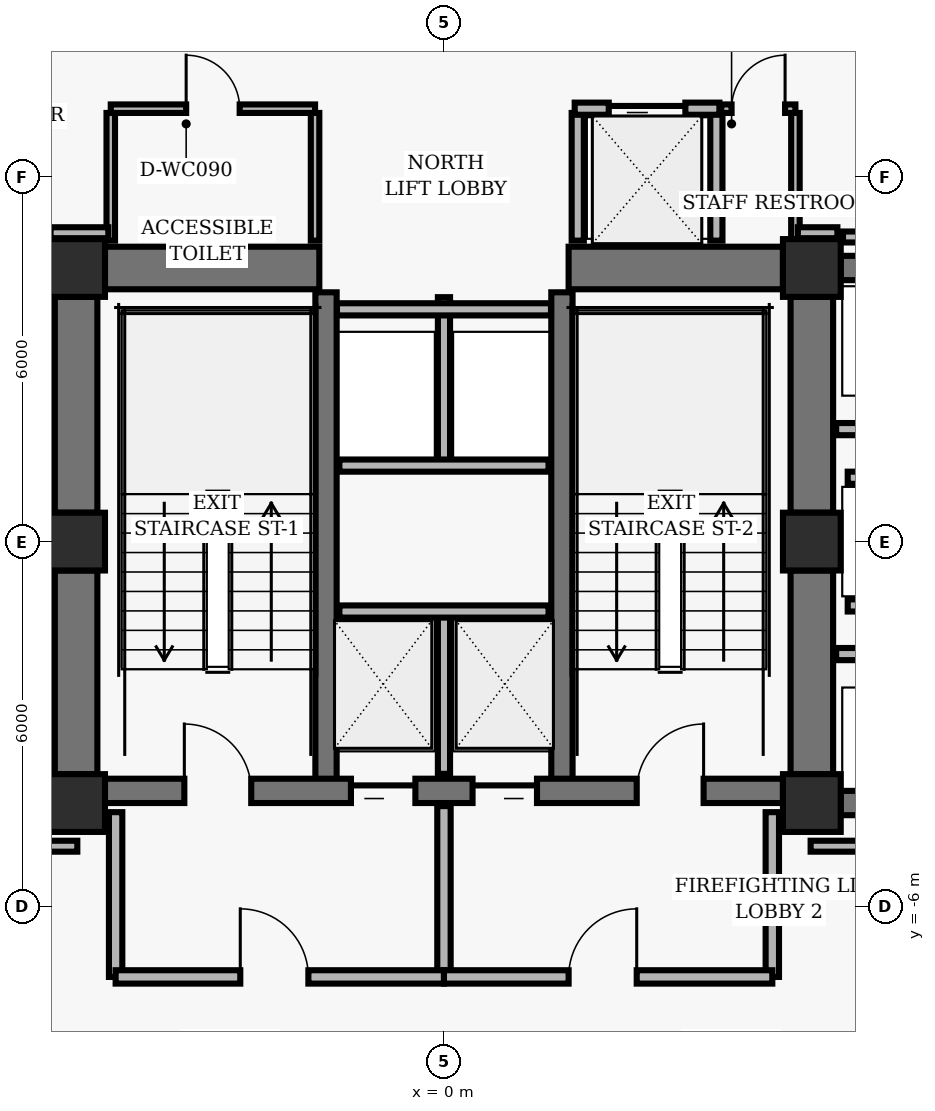
"""IFC4 building model, lengths in metres.
Left out: names, types, materials, properties, quantities, classifications, styles, units other than length and angle.
Written with IfcOpenShell. Run it as: python <this file> out.ifc"""

import sys

from ifc_helpers import new_model, si_unit, direction, frame, frame_2d, origin, origin_2d, place, context, subcontext, project, spatial, rectangle, hollow_rectangle, extrude, element, fill, save


model = new_model("IFC4")
c1 = context("Model", 3, precision=1e-05, world=origin(), true_north=direction((0.0, 1.0)))
c2 = subcontext(c1, "Body", "Model", "MODEL_VIEW")
j1 = project(units=[si_unit("LENGTHUNIT", "METRE"), si_unit("PLANEANGLEUNIT", "RADIAN")], contexts=[c1])
p1 = place(None, origin())
s1 = spatial("IfcSite", under=j1, at=p1, CompositionType="ELEMENT")
p2 = place(p1, origin())
s2 = spatial("IfcBuilding", under=s1, at=p2, CompositionType="ELEMENT")
p3 = place(p2, frame((0.0, 0.0, 25.6)))
s3 = spatial("IfcBuildingStorey", under=s2, at=p3, CompositionType="ELEMENT", Elevation=25.6)
for number, where, z_axis, x_axis in (
    (1, (-6.05, 4.5, 0.0), (0.0, 0.0, 1.0), (1.0, 0.0, 0.0)),
    (2, (6.05, 4.5, 0.0), (0.0, 0.0, 1.0), (1.0, 0.0, 0.0)),
    (3, (-6.05, 0.0, 0.0), (0.0, 0.0, 1.0), (1.0, 0.0, 0.0)),
    (4, (6.05, 0.0, 0.0), (0.0, 0.0, 1.0), (1.0, 0.0, 0.0)),
    (5, (-6.05, -4.3, 0.0), (0.0, 0.0, 1.0), (1.0, 0.0, 0.0)),
    (6, (6.05, -4.3, 0.0), (0.0, 0.0, 1.0), (1.0, 0.0, 0.0)),
):
    element("IfcColumn", number, at=place(p3, frame(where, z_axis=z_axis, x_axis=x_axis)), inside=s3, PredefinedType="COLUMN", context=c2, shape_type="SweptSolid", body=[
        extrude(hollow_rectangle(XDim=0.95, YDim=0.95, WallThickness=0.06, InnerFilletRadius=0.02, OuterFilletRadius=0.04, at=origin_2d()), origin(), (0.0, 0.0, 1.0), 3.36),
    ])
p4 = place(p3, frame((-6.05, 0.475, 0.0), z_axis=(0.0, 0.0, 1.0), x_axis=(0.0, 1.0, 0.0)))
e7 = element("IfcWall", 7, at=p4, inside=s3, PredefinedType="SHEAR", context=c2, shape_type="SweptSolid", body=[
    extrude(rectangle(XDim=3.55, YDim=0.7, at=frame_2d((1.775, 0.0))), origin(), (0.0, 0.0, 1.0), 3.098),
])
p5 = place(p3, frame((-6.05, -3.825, 0.0), z_axis=(0.0, 0.0, 1.0), x_axis=(0.0, 1.0, 0.0)))
e8 = element("IfcWall", 8, at=p5, inside=s3, PredefinedType="SHEAR", context=c2, shape_type="SweptSolid", body=[
    extrude(rectangle(XDim=3.35, YDim=0.7, at=frame_2d((1.675, 0.0))), origin(), (0.0, 0.0, 1.0), 3.098),
])
p6 = place(p3, frame((6.05, 0.475, 0.0), z_axis=(0.0, 0.0, 1.0), x_axis=(0.0, 1.0, 0.0)))
e9 = element("IfcWall", 9, at=p6, inside=s3, PredefinedType="SHEAR", context=c2, shape_type="SweptSolid", body=[
    extrude(rectangle(XDim=3.55, YDim=0.7, at=frame_2d((1.775, 0.0))), origin(), (0.0, 0.0, 1.0), 3.098),
])
p7 = place(p3, frame((6.05, -3.825, 0.0), z_axis=(0.0, 0.0, 1.0), x_axis=(0.0, 1.0, 0.0)))
e10 = element("IfcWall", 10, at=p7, inside=s3, PredefinedType="SHEAR", context=c2, shape_type="SweptSolid", body=[
    extrude(rectangle(XDim=3.35, YDim=0.7, at=frame_2d((1.675, 0.0))), origin(), (0.0, 0.0, 1.0), 3.098),
])
for number, where, z_axis, x_axis in (
    (11, (-1.94, -4.1, 0.0), (0.0, 0.0, 1.0), (0.0, 1.0, 0.0)),
    (12, (1.94, -4.1, 0.0), (0.0, 0.0, 1.0), (0.0, 1.0, 0.0)),
):
    element("IfcWall", number, at=place(p3, frame(where, z_axis=z_axis, x_axis=x_axis)), inside=s3, PredefinedType="SHEAR", context=c2, shape_type="SweptSolid", body=[
        extrude(rectangle(XDim=8.2, YDim=0.35, at=frame_2d((4.1, 0.0))), origin(), (0.0, 0.0, 1.0), 3.098),
    ])
p8 = place(p3, frame((-5.575, -4.1, 0.0), z_axis=(0.0, 0.0, 1.0), x_axis=(1.0, 0.0, 0.0)))
e13 = element("IfcWall", 13, at=p8, inside=s3, PredefinedType="SHEAR", context=c2, shape_type="SweptSolid", body=[
    extrude(rectangle(XDim=11.15, YDim=0.4, at=frame_2d((5.575, 0.0))), origin(), (0.0, 0.0, 1.0), 3.098),
])
p9 = place(p8, frame((1.305, 0.0, 0.0)))
e14 = element("IfcOpeningElement", 14, at=p9, cuts=e13, PredefinedType="OPENING", context=c2, shape_type="SweptSolid", body=[
    extrude(rectangle(XDim=1.1, YDim=2.04, at=frame_2d((0.55, 1.02))), frame((0.0, 0.21, 0.0), z_axis=(0.0, -1.0, 0.0), x_axis=(1.0, 0.0, 0.0)), (0.0, 0.0, 1.0), 0.42),
])
p10 = place(p8, frame((8.745, 0.0, 0.0)))
e15 = element("IfcOpeningElement", 15, at=p10, cuts=e13, PredefinedType="OPENING", context=c2, shape_type="SweptSolid", body=[
    extrude(rectangle(XDim=1.1, YDim=2.04, at=frame_2d((0.55, 1.02))), frame((0.0, 0.21, 0.0), z_axis=(0.0, -1.0, 0.0), x_axis=(1.0, 0.0, 0.0)), (0.0, 0.0, 1.0), 0.42),
])
p11 = place(p8, frame((4.045, 0.0, 0.0)))
e16 = element("IfcOpeningElement", 16, at=p11, cuts=e13, PredefinedType="OPENING", context=c2, shape_type="SweptSolid", body=[
    extrude(rectangle(XDim=1.06, YDim=2.04, at=frame_2d((0.53, 1.02))), frame((0.0, 0.21, 0.0), z_axis=(0.0, -1.0, 0.0), x_axis=(1.0, 0.0, 0.0)), (0.0, 0.0, 1.0), 0.42),
])
p12 = place(p8, frame((6.045, 0.0, 0.0)))
e17 = element("IfcOpeningElement", 17, at=p12, cuts=e13, PredefinedType="OPENING", context=c2, shape_type="SweptSolid", body=[
    extrude(rectangle(XDim=1.06, YDim=2.04, at=frame_2d((0.53, 1.02))), frame((0.0, 0.21, 0.0), z_axis=(0.0, -1.0, 0.0), x_axis=(1.0, 0.0, 0.0)), (0.0, 0.0, 1.0), 0.42),
])
for number, where, z_axis, x_axis in (
    (18, (-5.575, 4.5, 0.0), (0.0, 0.0, 1.0), (1.0, 0.0, 0.0)),
    (19, (2.05, 4.5, 0.0), (0.0, 0.0, 1.0), (1.0, 0.0, 0.0)),
):
    element("IfcWall", number, at=place(p3, frame(where, z_axis=z_axis, x_axis=x_axis)), inside=s3, PredefinedType="SHEAR", context=c2, shape_type="SweptSolid", body=[
        extrude(rectangle(XDim=3.525, YDim=0.7, at=frame_2d((1.762, 0.0))), origin(), (0.0, 0.0, 1.0), 3.098),
    ])
for number, where, z_axis, x_axis in (
    (20, (6.525, 4.5, 0.0), (0.0, 0.0, 1.0), (1.0, 0.0, 0.0)),
    (21, (6.525, -4.3, 0.0), (0.0, 0.0, 1.0), (1.0, 0.0, 0.0)),
):
    element("IfcWall", number, at=place(p3, frame(where, z_axis=z_axis, x_axis=x_axis)), inside=s3, PredefinedType="SHEAR", context=c2, shape_type="SweptSolid", body=[
        extrude(rectangle(XDim=1.95, YDim=0.4, at=frame_2d((0.975, 0.0))), origin(), (0.0, 0.0, 1.0), 3.098),
    ])
p13 = place(p3, frame((0.0, -3.82, 0.0), z_axis=(0.0, 0.0, 1.0), x_axis=(0.0, 1.0, 0.0)))
e22 = element("IfcWall", 22, at=p13, inside=s3, PredefinedType="PARTITIONING", context=c2, shape_type="SweptSolid", body=[
    extrude(rectangle(XDim=2.67, YDim=0.2, at=frame_2d((1.335, 0.0))), origin(), (0.0, 0.0, 1.0), 3.073),
])
p14 = place(p3, frame((-1.72, -1.15, 0.0), z_axis=(0.0, 0.0, 1.0), x_axis=(1.0, 0.0, 0.0)))
e23 = element("IfcWall", 23, at=p14, inside=s3, PredefinedType="PARTITIONING", context=c2, shape_type="SweptSolid", body=[
    extrude(rectangle(XDim=3.44, YDim=0.2, at=frame_2d((1.72, 0.0))), origin(), (0.0, 0.0, 1.0), 3.073),
])
for number, where, z_axis, x_axis in (
    (24, (-5.4, -7.16, 0.0), (0.0, 0.0, 1.0), (0.0, 1.0, 0.0)),
    (25, (5.4, -7.16, 0.0), (0.0, 0.0, 1.0), (0.0, 1.0, 0.0)),
):
    element("IfcWall", number, at=place(p3, frame(where, z_axis=z_axis, x_axis=x_axis)), inside=s3, PredefinedType="PARTITIONING", context=c2, shape_type="SweptSolid", body=[
        extrude(rectangle(XDim=2.71, YDim=0.22, at=frame_2d((1.355, 0.0))), origin(), (0.0, 0.0, 1.0), 3.073),
    ])
p15 = place(p3, frame((0.0, -7.16, 0.0), z_axis=(0.0, 0.0, 1.0), x_axis=(0.0, 1.0, 0.0)))
e26 = element("IfcWall", 26, at=p15, inside=s3, PredefinedType="PARTITIONING", context=c2, shape_type="SweptSolid", body=[
    extrude(rectangle(XDim=2.81, YDim=0.22, at=frame_2d((1.405, 0.0))), origin(), (0.0, 0.0, 1.0), 3.073),
])
p16 = place(p3, frame((-5.4, -7.16, 0.0), z_axis=(0.0, 0.0, 1.0), x_axis=(1.0, 0.0, 0.0)))
e27 = element("IfcWall", 27, at=p16, inside=s3, PredefinedType="PARTITIONING", context=c2, shape_type="SweptSolid", body=[
    extrude(rectangle(XDim=5.4, YDim=0.22, at=frame_2d((2.7, 0.0))), origin(), (0.0, 0.0, 1.0), 3.073),
])
p17 = place(p16, frame((2.05, 0.0, 0.0)))
e28 = element("IfcOpeningElement", 28, at=p17, cuts=e27, PredefinedType="OPENING", context=c2, shape_type="SweptSolid", body=[
    extrude(rectangle(XDim=1.12, YDim=2.02, at=frame_2d((0.56, 1.01))), frame((0.0, 0.12, 0.0), z_axis=(0.0, -1.0, 0.0), x_axis=(1.0, 0.0, 0.0)), (0.0, 0.0, 1.0), 0.24),
])
p18 = place(p3, frame((0.0, -7.16, 0.0), z_axis=(0.0, 0.0, 1.0), x_axis=(1.0, 0.0, 0.0)))
e29 = element("IfcWall", 29, at=p18, inside=s3, PredefinedType="PARTITIONING", context=c2, shape_type="SweptSolid", body=[
    extrude(rectangle(XDim=5.4, YDim=0.22, at=frame_2d((2.7, 0.0))), origin(), (0.0, 0.0, 1.0), 3.073),
])
p19 = place(p18, frame((2.05, 0.0, 0.0)))
e30 = element("IfcOpeningElement", 30, at=p19, cuts=e29, PredefinedType="OPENING", context=c2, shape_type="SweptSolid", body=[
    extrude(rectangle(XDim=1.12, YDim=2.02, at=frame_2d((0.56, 1.01))), frame((0.0, 0.12, 0.0), z_axis=(0.0, -1.0, 0.0), x_axis=(1.0, 0.0, 0.0)), (0.0, 0.0, 1.0), 0.24),
])
p20 = place(p3, frame((0.0, 1.25, 0.0), z_axis=(0.0, 0.0, 1.0), x_axis=(0.0, 1.0, 0.0)))
e31 = element("IfcWall", 31, at=p20, inside=s3, PredefinedType="PARTITIONING", context=c2, shape_type="SweptSolid", body=[
    extrude(rectangle(XDim=2.77, YDim=0.2, at=frame_2d((1.385, 0.0))), origin(), (0.0, 0.0, 1.0), 3.073),
])
p21 = place(p3, frame((-1.72, 1.25, 0.0), z_axis=(0.0, 0.0, 1.0), x_axis=(1.0, 0.0, 0.0)))
e32 = element("IfcWall", 32, at=p21, inside=s3, PredefinedType="PARTITIONING", context=c2, shape_type="SweptSolid", body=[
    extrude(rectangle(XDim=3.44, YDim=0.2, at=frame_2d((1.72, 0.0))), origin(), (0.0, 0.0, 1.0), 3.073),
])
p22 = place(p3, frame((-1.76, 3.82, 0.0), z_axis=(0.0, 0.0, 1.0), x_axis=(1.0, 0.0, 0.0)))
e33 = element("IfcWall", 33, at=p22, inside=s3, PredefinedType="PARTITIONING", context=c2, shape_type="SweptSolid", body=[
    extrude(rectangle(XDim=3.52, YDim=0.2, at=frame_2d((1.76, 0.0))), origin(), (0.0, 0.0, 1.0), 3.073),
])
for number, where, z_axis, x_axis in (
    (34, (2.2, 4.95, 0.0), (0.0, 0.0, 1.0), (0.0, 1.0, 0.0)),
    (35, (4.48, 4.95, 0.0), (0.0, 0.0, 1.0), (0.0, 1.0, 0.0)),
):
    element("IfcWall", number, at=place(p3, frame(where, z_axis=z_axis, x_axis=x_axis)), inside=s3, PredefinedType="PARTITIONING", context=c2, shape_type="SweptSolid", body=[
        extrude(rectangle(XDim=2.1, YDim=0.2, at=frame_2d((1.05, 0.0))), origin(), (0.0, 0.0, 1.0), 3.073),
    ])
p23 = place(p3, frame((2.15, 7.12, 0.0), z_axis=(0.0, 0.0, 1.0), x_axis=(1.0, 0.0, 0.0)))
e36 = element("IfcWall", 36, at=p23, inside=s3, PredefinedType="PARTITIONING", context=c2, shape_type="SweptSolid", body=[
    extrude(rectangle(XDim=2.38, YDim=0.2, at=frame_2d((1.19, 0.0))), origin(), (0.0, 0.0, 1.0), 3.073),
])
p24 = place(p23, frame((0.56, 0.0, 0.0)))
e37 = element("IfcOpeningElement", 37, at=p24, cuts=e36, PredefinedType="OPENING", context=c2, shape_type="SweptSolid", body=[
    extrude(rectangle(XDim=1.26, YDim=2.06, at=frame_2d((0.63, 1.03))), frame((0.0, 0.11, 0.0), z_axis=(0.0, -1.0, 0.0), x_axis=(1.0, 0.0, 0.0)), (0.0, 0.0, 1.0), 0.22),
])
for number, where, z_axis, x_axis in (
    (38, (-5.48, 4.95, 0.0), (0.0, 0.0, 1.0), (0.0, 1.0, 0.0)),
    (39, (-2.12, 4.95, 0.0), (0.0, 0.0, 1.0), (0.0, 1.0, 0.0)),
):
    element("IfcWall", number, at=place(p3, frame(where, z_axis=z_axis, x_axis=x_axis)), inside=s3, PredefinedType="PARTITIONING", context=c2, shape_type="SweptSolid", body=[
        extrude(rectangle(XDim=2.1, YDim=0.14, at=frame_2d((1.05, 0.0))), origin(), (0.0, 0.0, 1.0), 3.073),
    ])
p25 = place(p3, frame((-5.48, 7.12, 0.0), z_axis=(0.0, 0.0, 1.0), x_axis=(1.0, 0.0, 0.0)))
e40 = element("IfcWall", 40, at=p25, inside=s3, PredefinedType="PARTITIONING", context=c2, shape_type="SweptSolid", body=[
    extrude(rectangle(XDim=3.36, YDim=0.14, at=frame_2d((1.68, 0.0))), origin(), (0.0, 0.0, 1.0), 3.073),
])
p26 = place(p25, frame((1.24, 0.0, 0.0)))
e41 = element("IfcOpeningElement", 41, at=p26, cuts=e40, PredefinedType="OPENING", context=c2, shape_type="SweptSolid", body=[
    extrude(rectangle(XDim=0.88, YDim=2.02, at=frame_2d((0.44, 1.01))), frame((0.0, 0.08, 0.0), z_axis=(0.0, -1.0, 0.0), x_axis=(1.0, 0.0, 0.0)), (0.0, 0.0, 1.0), 0.16),
])
p27 = place(p3, frame((5.78, 4.95, 0.0), z_axis=(0.0, 0.0, 1.0), x_axis=(0.0, 1.0, 0.0)))
e42 = element("IfcWall", 42, at=p27, inside=s3, PredefinedType="PARTITIONING", context=c2, shape_type="SweptSolid", body=[
    extrude(rectangle(XDim=2.1, YDim=0.14, at=frame_2d((1.05, 0.0))), origin(), (0.0, 0.0, 1.0), 3.073),
])
p28 = place(p3, frame((4.56, 7.12, 0.0), z_axis=(0.0, 0.0, 1.0), x_axis=(1.0, 0.0, 0.0)))
e43 = element("IfcWall", 43, at=p28, inside=s3, PredefinedType="PARTITIONING", context=c2, shape_type="SweptSolid", body=[
    extrude(rectangle(XDim=1.22, YDim=0.14, at=frame_2d((0.61, 0.0))), origin(), (0.0, 0.0, 1.0), 3.073),
])
p29 = place(p28, frame((0.17, 0.0, 0.0)))
e44 = element("IfcOpeningElement", 44, at=p29, cuts=e43, PredefinedType="OPENING", context=c2, shape_type="SweptSolid", body=[
    extrude(rectangle(XDim=0.88, YDim=2.02, at=frame_2d((0.44, 1.01))), frame((0.0, 0.08, 0.0), z_axis=(0.0, -1.0, 0.0), x_axis=(1.0, 0.0, 0.0)), (0.0, 0.0, 1.0), 0.16),
])
for number, where, z_axis, x_axis in (
    (45, (6.45, -1.85, 0.0), (0.0, 0.0, 1.0), (1.0, 0.0, 0.0)),
    (46, (6.45, 1.85, 0.0), (0.0, 0.0, 1.0), (1.0, 0.0, 0.0)),
):
    element("IfcWall", number, at=place(p3, frame(where, z_axis=z_axis, x_axis=x_axis)), inside=s3, PredefinedType="PARTITIONING", context=c2, shape_type="SweptSolid", body=[
        extrude(rectangle(XDim=2.1, YDim=0.2, at=frame_2d((1.05, 0.0))), origin(), (0.0, 0.0, 1.0), 3.073),
    ])
for number, where, z_axis, x_axis in (
    (47, (6.64, -1.05, 0.0), (0.0, 0.0, 1.0), (1.0, 0.0, 0.0)),
    (48, (6.64, 1.05, 0.0), (0.0, 0.0, 1.0), (1.0, 0.0, 0.0)),
):
    element("IfcWall", number, at=place(p3, frame(where, z_axis=z_axis, x_axis=x_axis)), inside=s3, PredefinedType="PARTITIONING", context=c2, shape_type="SweptSolid", body=[
        extrude(rectangle(XDim=1.91, YDim=0.2, at=frame_2d((0.955, 0.0))), origin(), (0.0, 0.0, 1.0), 3.073),
    ])
for number, where, z_axis, x_axis in (
    (49, (-9.37, -5.01, 0.0), (0.0, 0.0, 1.0), (1.0, 0.0, 0.0)),
    (50, (6.03, -5.01, 0.0), (0.0, 0.0, 1.0), (1.0, 0.0, 0.0)),
):
    element("IfcWall", number, at=place(p3, frame(where, z_axis=z_axis, x_axis=x_axis)), inside=s3, PredefinedType="PARTITIONING", context=c2, shape_type="SweptSolid", body=[
        extrude(rectangle(XDim=3.34, YDim=0.18, at=frame_2d((1.67, 0.0))), origin(), (0.0, 0.0, 1.0), 3.073),
    ])
p30 = place(p3, frame((9.37, 5.01, 0.0), z_axis=(0.0, 0.0, 1.0), x_axis=(-1.0, 0.0, 0.0)))
e51 = element("IfcWall", 51, at=p30, inside=s3, PredefinedType="PARTITIONING", context=c2, shape_type="SweptSolid", body=[
    extrude(rectangle(XDim=2.808, YDim=0.18, at=frame_2d((1.404, 0.0))), origin(), (0.0, 0.0, 1.0), 3.073),
])
p31 = place(p3, frame((6.47, 5.08, 0.0), z_axis=(0.0, 0.0, 1.0), x_axis=(-1.0, 0.0, 0.0)))
e52 = element("IfcWall", 52, at=p31, inside=s3, PredefinedType="PARTITIONING", context=c2, shape_type="SweptSolid", body=[
    extrude(rectangle(XDim=0.65, YDim=0.18, at=frame_2d((0.325, 0.0))), origin(), (0.0, 0.0, 1.0), 3.073),
])
p32 = place(p3, frame((-5.52, 5.08, 0.0), z_axis=(0.0, 0.0, 1.0), x_axis=(-1.0, 0.0, 0.0)))
e53 = element("IfcWall", 53, at=p32, inside=s3, PredefinedType="PARTITIONING", context=c2, shape_type="SweptSolid", body=[
    extrude(rectangle(XDim=0.95, YDim=0.18, at=frame_2d((0.475, 0.0))), origin(), (0.0, 0.0, 1.0), 3.073),
])
p33 = place(p9, origin())
e54 = element("IfcDoor", 54, at=p33, inside=s3, OperationType="SINGLE_SWING_LEFT", PredefinedType="DOOR", context=c2, shape_type="SweptSolid", body=[
    extrude(rectangle(XDim=1.1, YDim=2.04, at=frame_2d((0.55, 1.02))), frame((0.0, 0.025, 0.0), z_axis=(0.0, -1.0, 0.0), x_axis=(1.0, 0.0, 0.0)), (0.0, 0.0, 1.0), 0.05),
])
fill(e14, e54)
p34 = place(p10, origin())
e55 = element("IfcDoor", 55, at=p34, inside=s3, OperationType="SINGLE_SWING_RIGHT", PredefinedType="DOOR", context=c2, shape_type="SweptSolid", body=[
    extrude(rectangle(XDim=1.1, YDim=2.04, at=frame_2d((0.55, 1.02))), frame((0.0, 0.025, 0.0), z_axis=(0.0, -1.0, 0.0), x_axis=(1.0, 0.0, 0.0)), (0.0, 0.0, 1.0), 0.05),
])
fill(e15, e55)
p35 = place(p11, origin())
e56 = element("IfcDoor", 56, at=p35, inside=s3, OperationType="SLIDING_TO_LEFT", PredefinedType="DOOR", context=c2, shape_type="SweptSolid", body=[
    extrude(rectangle(XDim=1.06, YDim=2.04, at=frame_2d((0.53, 1.02))), frame((0.0, 0.025, 0.0), z_axis=(0.0, -1.0, 0.0), x_axis=(1.0, 0.0, 0.0)), (0.0, 0.0, 1.0), 0.05),
])
fill(e16, e56)
p36 = place(p12, origin())
e57 = element("IfcDoor", 57, at=p36, inside=s3, OperationType="SLIDING_TO_RIGHT", PredefinedType="DOOR", context=c2, shape_type="SweptSolid", body=[
    extrude(rectangle(XDim=1.06, YDim=2.04, at=frame_2d((0.53, 1.02))), frame((0.0, 0.025, 0.0), z_axis=(0.0, -1.0, 0.0), x_axis=(1.0, 0.0, 0.0)), (0.0, 0.0, 1.0), 0.05),
])
fill(e17, e57)
p37 = place(p17, origin())
e58 = element("IfcDoor", 58, at=p37, inside=s3, OperationType="SINGLE_SWING_LEFT", PredefinedType="DOOR", context=c2, shape_type="SweptSolid", body=[
    extrude(rectangle(XDim=1.12, YDim=2.02, at=frame_2d((0.56, 1.01))), frame((0.0, 0.025, 0.0), z_axis=(0.0, -1.0, 0.0), x_axis=(1.0, 0.0, 0.0)), (0.0, 0.0, 1.0), 0.05),
])
fill(e28, e58)
p38 = place(p19, origin())
e59 = element("IfcDoor", 59, at=p38, inside=s3, OperationType="SINGLE_SWING_RIGHT", PredefinedType="DOOR", context=c2, shape_type="SweptSolid", body=[
    extrude(rectangle(XDim=1.12, YDim=2.02, at=frame_2d((0.56, 1.01))), frame((0.0, 0.025, 0.0), z_axis=(0.0, -1.0, 0.0), x_axis=(1.0, 0.0, 0.0)), (0.0, 0.0, 1.0), 0.05),
])
fill(e30, e59)
p39 = place(p24, origin())
e60 = element("IfcDoor", 60, at=p39, inside=s3, OperationType="SLIDING_TO_LEFT", PredefinedType="DOOR", context=c2, shape_type="SweptSolid", body=[
    extrude(rectangle(XDim=1.26, YDim=2.06, at=frame_2d((0.63, 1.03))), frame((0.0, 0.025, 0.0), z_axis=(0.0, -1.0, 0.0), x_axis=(1.0, 0.0, 0.0)), (0.0, 0.0, 1.0), 0.05),
])
fill(e37, e60)
p40 = place(p26, origin())
e61 = element("IfcDoor", 61, at=p40, inside=s3, OperationType="SINGLE_SWING_LEFT", PredefinedType="DOOR", context=c2, shape_type="SweptSolid", body=[
    extrude(rectangle(XDim=0.88, YDim=2.02, at=frame_2d((0.44, 1.01))), frame((0.0, 0.025, 0.0), z_axis=(0.0, -1.0, 0.0), x_axis=(1.0, 0.0, 0.0)), (0.0, 0.0, 1.0), 0.05),
])
fill(e41, e61)
p41 = place(p29, origin())
e62 = element("IfcDoor", 62, at=p41, inside=s3, OperationType="SINGLE_SWING_RIGHT", PredefinedType="DOOR", context=c2, shape_type="SweptSolid", body=[
    extrude(rectangle(XDim=0.88, YDim=2.02, at=frame_2d((0.44, 1.01))), frame((0.0, 0.025, 0.0), z_axis=(0.0, -1.0, 0.0), x_axis=(1.0, 0.0, 0.0)), (0.0, 0.0, 1.0), 0.05),
])
fill(e44, e62)
save(model, sys.argv[1])
